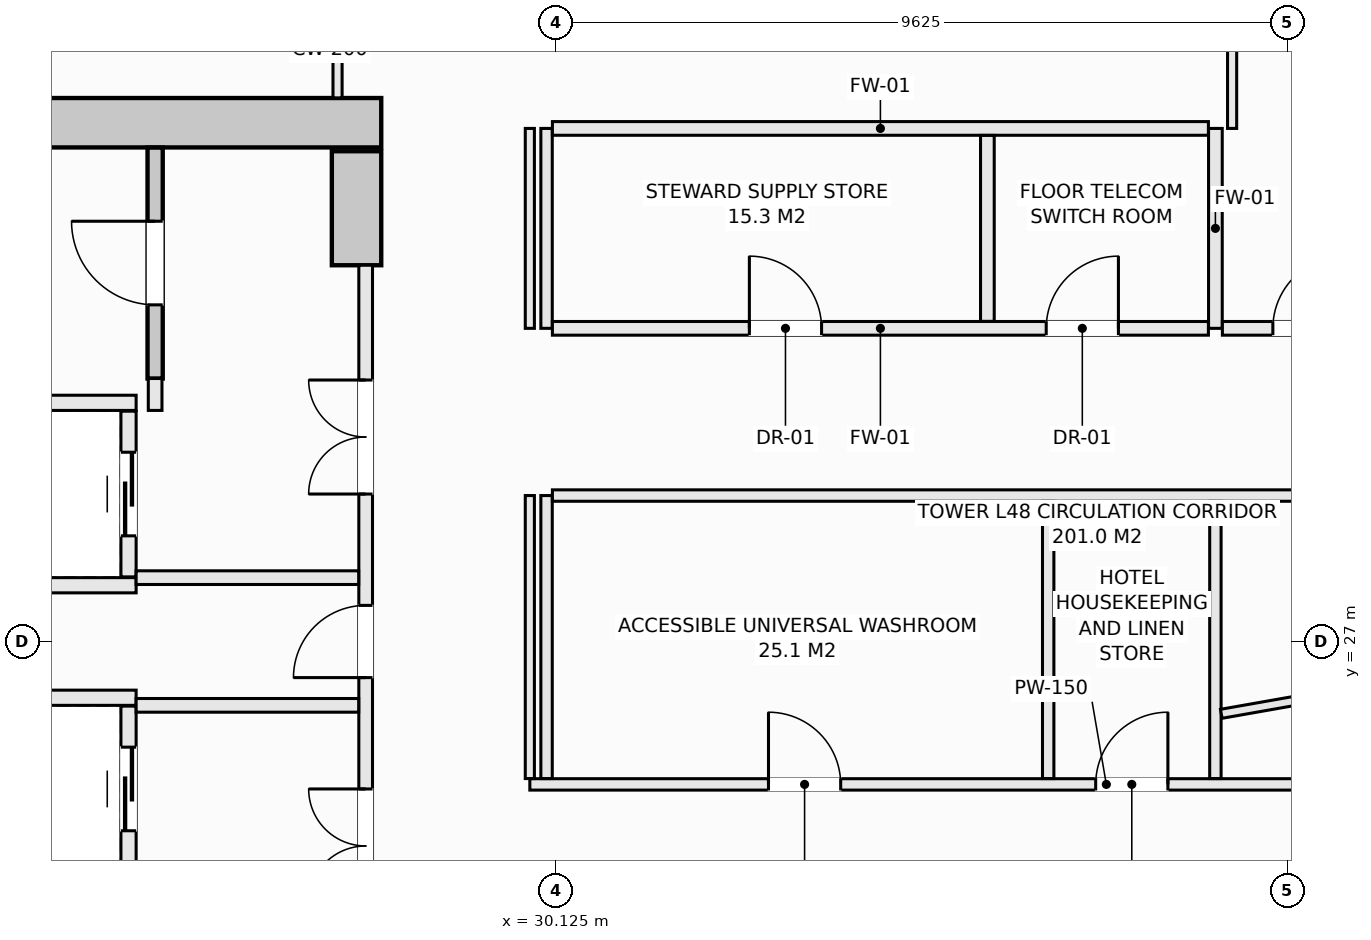
"""IFC4 building model, lengths in metres.
Left out: names, types, materials, properties, quantities, classifications, styles, units other than length and angle.
Written with IfcOpenShell. Run it as: python <this file> out.ifc"""

import sys

from ifc_helpers import new_model, si_unit, direction, frame, frame_2d, origin, place, context, subcontext, project, spatial, rectangle, extrude, element, fill, save


model = new_model("IFC4")
c1 = context("Model", 3, precision=1e-05, world=origin(), true_north=direction((0.0, 1.0)))
c2 = subcontext(c1, "Body", "Model", "MODEL_VIEW")
j1 = project(units=[si_unit("LENGTHUNIT", "METRE"), si_unit("PLANEANGLEUNIT", "RADIAN")], contexts=[c1])
p1 = place(None, origin())
s1 = spatial("IfcSite", under=j1, at=p1, CompositionType="ELEMENT")
p2 = place(p1, origin())
s2 = spatial("IfcBuilding", under=s1, at=p2, CompositionType="ELEMENT")
p3 = place(p2, frame((0.0, 0.0, 183.5)))
s3 = spatial("IfcBuildingStorey", under=s2, at=p3, CompositionType="ELEMENT", Elevation=183.5)
p4 = place(p3, frame((14.175, 33.825, -0.27), z_axis=(0.0, 0.0, 1.0), x_axis=(1.0, 0.0, 0.0)))
e1 = element("IfcWall", 1, at=p4, inside=s3, PredefinedType="SHEAR", context=c2, shape_type="SweptSolid", body=[
    extrude(rectangle(XDim=13.65, YDim=0.65, at=frame_2d((6.825, 0.0))), origin(), (0.0, 0.0, 1.0), 3.35),
])
p5 = place(p3, frame((27.5, 31.95, -0.27), z_axis=(0.0, 0.0, 1.0), x_axis=(0.0, 1.0, 0.0)))
e2 = element("IfcWall", 2, at=p5, inside=s3, PredefinedType="SHEAR", context=c2, shape_type="SweptSolid", body=[
    extrude(rectangle(XDim=1.5, YDim=0.65, at=frame_2d((0.75, 0.0))), origin(), (0.0, 0.0, 1.0), 3.35),
])
p6 = place(p3, frame((24.85, 30.46, -0.27), z_axis=(0.0, 0.0, 1.0), x_axis=(0.0, 1.0, 0.0)))
e3 = element("IfcWall", 3, at=p6, inside=s3, PredefinedType="SHEAR", context=c2, shape_type="SweptSolid", body=[
    extrude(rectangle(XDim=3.038, YDim=0.2, at=frame_2d((1.519, 0.0))), origin(), (0.0, 0.0, 1.0), 3.35),
])
p7 = place(p6, frame((0.969, 0.0, 0.27)))
e4 = element("IfcOpeningElement", 4, at=p7, cuts=e3, PredefinedType="OPENING", context=c2, shape_type="SweptSolid", body=[
    extrude(rectangle(XDim=1.1, YDim=2.15, at=frame_2d((0.55, 1.075))), frame((0.0, 0.11, 0.0), z_axis=(0.0, -1.0, 0.0), x_axis=(1.0, 0.0, 0.0)), (0.0, 0.0, 1.0), 0.22),
])
for number, where, z_axis, x_axis in (
    (5, (22.15, 30.14, 0.0), (0.0, 0.0, 1.0), (1.0, 0.0, 0.0)),
    (6, (22.15, 27.74, 0.0), (0.0, 0.0, 1.0), (1.0, 0.0, 0.0)),
):
    element("IfcWall", number, at=place(p3, frame(where, z_axis=z_axis, x_axis=x_axis)), inside=s3, PredefinedType="SOLIDWALL", context=c2, shape_type="SweptSolid", body=[
        extrude(rectangle(XDim=2.45, YDim=0.2, at=frame_2d((1.225, 0.0))), origin(), (0.0, 0.0, 1.0), 3.08),
    ])
p8 = place(p3, frame((24.5, 27.85, 0.0), z_axis=(0.0, 0.0, 1.0), x_axis=(0.0, 1.0, 0.0)))
e7 = element("IfcWall", 7, at=p8, inside=s3, PredefinedType="SOLIDWALL", context=c2, shape_type="SweptSolid", body=[
    extrude(rectangle(XDim=2.18, YDim=0.2, at=frame_2d((1.09, 0.0))), origin(), (0.0, 0.0, 1.0), 3.08),
])
p9 = place(p8, frame((0.54, 0.0, 0.0)))
e8 = element("IfcOpeningElement", 8, at=p9, cuts=e7, PredefinedType="OPENING", context=c2, shape_type="SweptSolid", body=[
    extrude(rectangle(XDim=1.1, YDim=2.2, at=frame_2d((0.55, 1.1))), frame((0.0, 0.11, 0.0), z_axis=(0.0, -1.0, 0.0), x_axis=(1.0, 0.0, 0.0)), (0.0, 0.0, 1.0), 0.22),
])
p10 = place(p3, frame((22.15, 26.26, 0.0), z_axis=(0.0, 0.0, 1.0), x_axis=(1.0, 0.0, 0.0)))
e9 = element("IfcWall", 9, at=p10, inside=s3, PredefinedType="SOLIDWALL", context=c2, shape_type="SweptSolid", body=[
    extrude(rectangle(XDim=2.45, YDim=0.2, at=frame_2d((1.225, 0.0))), origin(), (0.0, 0.0, 1.0), 3.08),
])
p11 = place(p3, frame((24.5, 23.97, 0.0), z_axis=(0.0, 0.0, 1.0), x_axis=(0.0, 1.0, 0.0)))
e10 = element("IfcWall", 10, at=p11, inside=s3, PredefinedType="SOLIDWALL", context=c2, shape_type="SweptSolid", body=[
    extrude(rectangle(XDim=2.18, YDim=0.2, at=frame_2d((1.09, 0.0))), origin(), (0.0, 0.0, 1.0), 3.08),
])
p12 = place(p11, frame((0.54, 0.0, 0.0)))
e11 = element("IfcOpeningElement", 11, at=p12, cuts=e10, PredefinedType="OPENING", context=c2, shape_type="SweptSolid", body=[
    extrude(rectangle(XDim=1.1, YDim=2.2, at=frame_2d((0.55, 1.1))), frame((0.0, 0.11, 0.0), z_axis=(0.0, -1.0, 0.0), x_axis=(1.0, 0.0, 0.0)), (0.0, 0.0, 1.0), 0.22),
])
p13 = place(p3, frame((24.85, 30.04, 0.0), z_axis=(0.0, 0.0, 1.0), x_axis=(0.0, 1.0, 0.0)))
e12 = element("IfcWall", 12, at=p13, inside=s3, PredefinedType="SOLIDWALL", context=c2, shape_type="SweptSolid", body=[
    extrude(rectangle(XDim=0.42, YDim=0.18, at=frame_2d((0.21, 0.0))), origin(), (0.0, 0.0, 1.0), 3.08),
])
p14 = place(p3, frame((27.62, 22.05, 0.0), z_axis=(0.0, 0.0, 1.0), x_axis=(0.0, 1.0, 0.0)))
e13 = element("IfcWall", 13, at=p14, inside=s3, PredefinedType="SOLIDWALL", context=c2, shape_type="SweptSolid", body=[
    extrude(rectangle(XDim=9.9, YDim=0.18, at=frame_2d((4.95, 0.0))), origin(), (0.0, 0.0, 1.0), 3.08),
])
p15 = place(p14, frame((4.475, 0.0, 0.0)))
e14 = element("IfcOpeningElement", 14, at=p15, cuts=e13, PredefinedType="OPENING", context=c2, shape_type="SweptSolid", body=[
    extrude(rectangle(XDim=0.95, YDim=2.1, at=frame_2d((0.475, 1.05))), frame((0.0, 0.1, 0.0), z_axis=(0.0, -1.0, 0.0), x_axis=(1.0, 0.0, 0.0)), (0.0, 0.0, 1.0), 0.2),
])
p16 = place(p14, frame((6.89, 0.0, 0.0)))
e15 = element("IfcOpeningElement", 15, at=p16, cuts=e13, PredefinedType="OPENING", context=c2, shape_type="SweptSolid", body=[
    extrude(rectangle(XDim=1.5, YDim=2.2, at=frame_2d((0.75, 1.1))), frame((0.0, 0.1, 0.0), z_axis=(0.0, -1.0, 0.0), x_axis=(1.0, 0.0, 0.0)), (0.0, 0.0, 1.0), 0.2),
])
p17 = place(p14, frame((1.51, 0.0, 0.0)))
e16 = element("IfcOpeningElement", 16, at=p17, cuts=e13, PredefinedType="OPENING", context=c2, shape_type="SweptSolid", body=[
    extrude(rectangle(XDim=1.5, YDim=2.2, at=frame_2d((0.75, 1.1))), frame((0.0, 0.1, 0.0), z_axis=(0.0, -1.0, 0.0), x_axis=(1.0, 0.0, 0.0)), (0.0, 0.0, 1.0), 0.2),
])
for number, where, z_axis, x_axis in (
    (17, (24.6, 27.84, 0.0), (0.0, 0.0, 1.0), (1.0, 0.0, 0.0)),
    (18, (24.6, 26.16, 0.0), (0.0, 0.0, 1.0), (1.0, 0.0, 0.0)),
):
    element("IfcWall", number, at=place(p3, frame(where, z_axis=z_axis, x_axis=x_axis)), inside=s3, PredefinedType="SOLIDWALL", context=c2, shape_type="SweptSolid", body=[
        extrude(rectangle(XDim=2.928, YDim=0.18, at=frame_2d((1.464, 0.0))), origin(), (0.0, 0.0, 1.0), 3.08),
    ])
p18 = place(p3, frame((29.78, 25.12, 0.0), z_axis=(0.0, 0.0, 1.0), x_axis=(1.0, 0.0, 0.0)))
e19 = element("IfcWall", 19, at=p18, inside=s3, PredefinedType="PARTITIONING", context=c2, shape_type="SweptSolid", body=[
    extrude(rectangle(XDim=15.17, YDim=0.15, at=frame_2d((7.585, 0.0))), origin(), (0.0, 0.0, 1.0), 3.08),
])
p19 = place(p18, frame((3.14, 0.0, 0.0)))
e20 = element("IfcOpeningElement", 20, at=p19, cuts=e19, PredefinedType="OPENING", context=c2, shape_type="SweptSolid", body=[
    extrude(rectangle(XDim=0.95, YDim=2.1, at=frame_2d((0.475, 1.05))), frame((0.0, 0.085, 0.0), z_axis=(0.0, -1.0, 0.0), x_axis=(1.0, 0.0, 0.0)), (0.0, 0.0, 1.0), 0.17),
])
p20 = place(p18, frame((7.445, 0.0, 0.0)))
e21 = element("IfcOpeningElement", 21, at=p20, cuts=e19, PredefinedType="OPENING", context=c2, shape_type="SweptSolid", body=[
    extrude(rectangle(XDim=0.95, YDim=2.1, at=frame_2d((0.475, 1.05))), frame((0.0, 0.085, 0.0), z_axis=(0.0, -1.0, 0.0), x_axis=(1.0, 0.0, 0.0)), (0.0, 0.0, 1.0), 0.17),
])
p21 = place(p3, frame((30.0, 25.197, 0.0), z_axis=(0.0, 0.0, 1.0), x_axis=(0.0, 1.0, 0.0)))
e22 = element("IfcWall", 22, at=p21, inside=s3, PredefinedType="PARTITIONING", context=c2, shape_type="SweptSolid", body=[
    extrude(rectangle(XDim=3.723, YDim=0.15, at=frame_2d((1.861, 0.0))), origin(), (0.0, 0.0, 1.0), 3.08),
])
p22 = place(p3, frame((30.0, 31.12, 0.0), z_axis=(0.0, 0.0, 1.0), x_axis=(0.0, 1.0, 0.0)))
e23 = element("IfcWall", 23, at=p22, inside=s3, PredefinedType="PARTITIONING", context=c2, shape_type="SweptSolid", body=[
    extrude(rectangle(XDim=2.63, YDim=0.15, at=frame_2d((1.315, 0.0))), origin(), (0.0, 0.0, 1.0), 3.08),
])
p23 = place(p3, frame((30.077, 28.92, 0.0), z_axis=(0.0, 0.0, 1.0), x_axis=(1.0, 0.0, 0.0)))
e24 = element("IfcWall", 24, at=p23, inside=s3, PredefinedType="PARTITIONING", context=c2, shape_type="SweptSolid", body=[
    extrude(rectangle(XDim=14.873, YDim=0.15, at=frame_2d((7.437, 0.0))), origin(), (0.0, 0.0, 1.0), 3.08),
])
p24 = place(p23, frame((11.118, 0.0, 0.0)))
e25 = element("IfcOpeningElement", 25, at=p24, cuts=e24, PredefinedType="OPENING", context=c2, shape_type="SweptSolid", body=[
    extrude(rectangle(XDim=0.95, YDim=2.1, at=frame_2d((0.475, 1.05))), frame((0.0, 0.085, 0.0), z_axis=(0.0, -1.0, 0.0), x_axis=(1.0, 0.0, 0.0)), (0.0, 0.0, 1.0), 0.17),
])
for number, where, z_axis, x_axis in (
    (26, (36.6, 25.197, 0.0), (0.0, 0.0, 1.0), (0.0, 1.0, 0.0)),
    (27, (38.8, 25.197, 0.0), (0.0, 0.0, 1.0), (0.0, 1.0, 0.0)),
):
    element("IfcWall", number, at=place(p3, frame(where, z_axis=z_axis, x_axis=x_axis)), inside=s3, PredefinedType="PARTITIONING", context=c2, shape_type="SweptSolid", body=[
        extrude(rectangle(XDim=3.646, YDim=0.15, at=frame_2d((1.823, 0.0))), origin(), (0.0, 0.0, 1.0), 3.08),
    ])
p25 = place(p3, frame((38.8, 31.12, 0.0), z_axis=(0.0, 0.0, 1.0), x_axis=(0.0, 1.0, 0.0)))
e28 = element("IfcWall", 28, at=p25, inside=s3, PredefinedType="SOLIDWALL", context=c2, shape_type="SweptSolid", body=[
    extrude(rectangle(XDim=2.63, YDim=0.18, at=frame_2d((1.315, 0.0))), origin(), (0.0, 0.0, 1.0), 3.08),
])
p26 = place(p3, frame((30.077, 31.12, 0.0), z_axis=(0.0, 0.0, 1.0), x_axis=(1.0, 0.0, 0.0)))
e29 = element("IfcWall", 29, at=p26, inside=s3, PredefinedType="SOLIDWALL", context=c2, shape_type="SweptSolid", body=[
    extrude(rectangle(XDim=8.631, YDim=0.18, at=frame_2d((4.315, 0.0))), origin(), (0.0, 0.0, 1.0), 3.08),
])
p27 = place(p26, frame((2.592, 0.0, 0.0)))
e30 = element("IfcOpeningElement", 30, at=p27, cuts=e29, PredefinedType="OPENING", context=c2, shape_type="SweptSolid", body=[
    extrude(rectangle(XDim=0.95, YDim=2.1, at=frame_2d((0.475, 1.05))), frame((0.0, 0.1, 0.0), z_axis=(0.0, -1.0, 0.0), x_axis=(1.0, 0.0, 0.0)), (0.0, 0.0, 1.0), 0.2),
])
p28 = place(p26, frame((6.497, 0.0, 0.0)))
e31 = element("IfcOpeningElement", 31, at=p28, cuts=e29, PredefinedType="OPENING", context=c2, shape_type="SweptSolid", body=[
    extrude(rectangle(XDim=0.95, YDim=2.1, at=frame_2d((0.475, 1.05))), frame((0.0, 0.1, 0.0), z_axis=(0.0, -1.0, 0.0), x_axis=(1.0, 0.0, 0.0)), (0.0, 0.0, 1.0), 0.2),
])
p29 = place(p3, frame((38.892, 31.12, 0.0), z_axis=(0.0, 0.0, 1.0), x_axis=(1.0, 0.0, 0.0)))
e32 = element("IfcWall", 32, at=p29, inside=s3, PredefinedType="SOLIDWALL", context=c2, shape_type="SweptSolid", body=[
    extrude(rectangle(XDim=6.058, YDim=0.18, at=frame_2d((3.029, 0.0))), origin(), (0.0, 0.0, 1.0), 3.08),
])
p30 = place(p29, frame((3.703, 0.0, 0.0)))
e33 = element("IfcOpeningElement", 33, at=p30, cuts=e32, PredefinedType="OPENING", context=c2, shape_type="SweptSolid", body=[
    extrude(rectangle(XDim=0.95, YDim=2.1, at=frame_2d((0.475, 1.05))), frame((0.0, 0.1, 0.0), z_axis=(0.0, -1.0, 0.0), x_axis=(1.0, 0.0, 0.0)), (0.0, 0.0, 1.0), 0.2),
])
p31 = place(p29, frame((0.664, 0.0, 0.0)))
e34 = element("IfcOpeningElement", 34, at=p31, cuts=e32, PredefinedType="OPENING", context=c2, shape_type="SweptSolid", body=[
    extrude(rectangle(XDim=0.95, YDim=2.1, at=frame_2d((0.475, 1.05))), frame((0.0, 0.1, 0.0), z_axis=(0.0, -1.0, 0.0), x_axis=(1.0, 0.0, 0.0)), (0.0, 0.0, 1.0), 0.2),
])
p32 = place(p3, frame((30.077, 33.75, 0.0), z_axis=(0.0, 0.0, 1.0), x_axis=(1.0, 0.0, 0.0)))
e35 = element("IfcWall", 35, at=p32, inside=s3, PredefinedType="SOLIDWALL", context=c2, shape_type="SweptSolid", body=[
    extrude(rectangle(XDim=8.631, YDim=0.18, at=frame_2d((4.315, 0.0))), origin(), (0.0, 0.0, 1.0), 3.08),
])
p33 = place(p3, frame((35.8, 31.212, 0.0), z_axis=(0.0, 0.0, 1.0), x_axis=(0.0, 1.0, 0.0)))
e36 = element("IfcWall", 36, at=p33, inside=s3, PredefinedType="SOLIDWALL", context=c2, shape_type="SweptSolid", body=[
    extrude(rectangle(XDim=2.446, YDim=0.18, at=frame_2d((1.223, 0.0))), origin(), (0.0, 0.0, 1.0), 3.08),
])
p34 = place(p3, frame((39.02, 33.75, 0.0), z_axis=(0.0, 0.0, 1.0), x_axis=(0.0, 1.0, 0.0)))
e37 = element("IfcWall", 37, at=p34, inside=s3, PredefinedType="PARTITIONING", context=c2, shape_type="SweptSolid", body=[
    extrude(rectangle(XDim=2.0, YDim=0.12, at=frame_2d((1.0, 0.0))), origin(), (0.0, 0.0, 1.0), 3.08),
])
p35 = place(p3, frame((27.25, 34.152, 0.0), z_axis=(0.0, 0.0, 1.0), x_axis=(0.0, 1.0, 0.0)))
e38 = element("IfcWall", 38, at=p35, inside=s3, PredefinedType="PARTITIONING", context=c2, shape_type="SweptSolid", body=[
    extrude(rectangle(XDim=0.806, YDim=0.12, at=frame_2d((0.403, 0.0))), origin(), (0.0, 0.0, 1.0), 3.08),
])
p36 = place(p3, frame((29.78, 25.197, 0.0), z_axis=(0.0, 0.0, 1.0), x_axis=(0.0, 1.0, 0.0)))
e39 = element("IfcWall", 39, at=p36, inside=s3, PredefinedType="PARTITIONING", context=c2, shape_type="SweptSolid", body=[
    extrude(rectangle(XDim=3.723, YDim=0.12, at=frame_2d((1.861, 0.0))), origin(), (0.0, 0.0, 1.0), 3.08),
])
p37 = place(p3, frame((29.78, 31.12, 0.0), z_axis=(0.0, 0.0, 1.0), x_axis=(0.0, 1.0, 0.0)))
e40 = element("IfcWall", 40, at=p37, inside=s3, PredefinedType="PARTITIONING", context=c2, shape_type="SweptSolid", body=[
    extrude(rectangle(XDim=2.63, YDim=0.12, at=frame_2d((1.315, 0.0))), origin(), (0.0, 0.0, 1.0), 3.08),
])
p38 = place(p3, frame((38.877, 26.049, 0.0), z_axis=(0.0, 0.0, 1.0), x_axis=(0.984853517989, 0.173388431286, 0.0)))
e41 = element("IfcWall", 41, at=p38, inside=s3, PredefinedType="PARTITIONING", context=c2, shape_type="SweptSolid", body=[
    extrude(rectangle(XDim=2.702, YDim=0.12, at=frame_2d((1.351, 0.0))), origin(), (0.0, 0.0, 1.0), 3.08),
])
p39 = place(p7, origin())
e42 = element("IfcDoor", 42, at=p39, inside=s3, OperationType="SINGLE_SWING_RIGHT", PredefinedType="DOOR", context=c2, shape_type="SweptSolid", body=[
    extrude(rectangle(XDim=1.1, YDim=2.15, at=frame_2d((0.55, 1.075))), frame((0.0, 0.025, 0.0), z_axis=(0.0, -1.0, 0.0), x_axis=(1.0, 0.0, 0.0)), (0.0, 0.0, 1.0), 0.05),
])
fill(e4, e42)
p40 = place(p9, origin())
e43 = element("IfcDoor", 43, at=p40, inside=s3, OperationType="SLIDING_TO_LEFT", PredefinedType="DOOR", context=c2, shape_type="SweptSolid", body=[
    extrude(rectangle(XDim=1.1, YDim=2.2, at=frame_2d((0.55, 1.1))), frame((0.0, 0.025, 0.0), z_axis=(0.0, -1.0, 0.0), x_axis=(1.0, 0.0, 0.0)), (0.0, 0.0, 1.0), 0.05),
])
fill(e8, e43)
p41 = place(p12, origin())
e44 = element("IfcDoor", 44, at=p41, inside=s3, OperationType="SLIDING_TO_LEFT", PredefinedType="DOOR", context=c2, shape_type="SweptSolid", body=[
    extrude(rectangle(XDim=1.1, YDim=2.2, at=frame_2d((0.55, 1.1))), frame((0.0, 0.025, 0.0), z_axis=(0.0, -1.0, 0.0), x_axis=(1.0, 0.0, 0.0)), (0.0, 0.0, 1.0), 0.05),
])
fill(e11, e44)
p42 = place(p15, origin())
e45 = element("IfcDoor", 45, at=p42, inside=s3, OperationType="SINGLE_SWING_LEFT", PredefinedType="DOOR", context=c2, shape_type="SweptSolid", body=[
    extrude(rectangle(XDim=0.95, YDim=2.1, at=frame_2d((0.475, 1.05))), frame((0.0, 0.025, 0.0), z_axis=(0.0, -1.0, 0.0), x_axis=(1.0, 0.0, 0.0)), (0.0, 0.0, 1.0), 0.05),
])
fill(e14, e45)
p43 = place(p16, origin())
e46 = element("IfcDoor", 46, at=p43, inside=s3, OperationType="DOUBLE_DOOR_SINGLE_SWING", PredefinedType="DOOR", context=c2, shape_type="SweptSolid", body=[
    extrude(rectangle(XDim=1.5, YDim=2.2, at=frame_2d((0.75, 1.1))), frame((0.0, 0.025, 0.0), z_axis=(0.0, -1.0, 0.0), x_axis=(1.0, 0.0, 0.0)), (0.0, 0.0, 1.0), 0.05),
])
fill(e15, e46)
p44 = place(p17, origin())
e47 = element("IfcDoor", 47, at=p44, inside=s3, OperationType="DOUBLE_DOOR_SINGLE_SWING", PredefinedType="DOOR", context=c2, shape_type="SweptSolid", body=[
    extrude(rectangle(XDim=1.5, YDim=2.2, at=frame_2d((0.75, 1.1))), frame((0.0, 0.025, 0.0), z_axis=(0.0, -1.0, 0.0), x_axis=(1.0, 0.0, 0.0)), (0.0, 0.0, 1.0), 0.05),
])
fill(e16, e47)
p45 = place(p19, origin())
e48 = element("IfcDoor", 48, at=p45, inside=s3, OperationType="SINGLE_SWING_LEFT", PredefinedType="DOOR", context=c2, shape_type="SweptSolid", body=[
    extrude(rectangle(XDim=0.95, YDim=2.1, at=frame_2d((0.475, 1.05))), frame((0.0, 0.025, 0.0), z_axis=(0.0, -1.0, 0.0), x_axis=(1.0, 0.0, 0.0)), (0.0, 0.0, 1.0), 0.05),
])
fill(e20, e48)
p46 = place(p20, origin())
e49 = element("IfcDoor", 49, at=p46, inside=s3, OperationType="SINGLE_SWING_RIGHT", PredefinedType="DOOR", context=c2, shape_type="SweptSolid", body=[
    extrude(rectangle(XDim=0.95, YDim=2.1, at=frame_2d((0.475, 1.05))), frame((0.0, 0.025, 0.0), z_axis=(0.0, -1.0, 0.0), x_axis=(1.0, 0.0, 0.0)), (0.0, 0.0, 1.0), 0.05),
])
fill(e21, e49)
p47 = place(p27, origin())
e50 = element("IfcDoor", 50, at=p47, inside=s3, OperationType="SINGLE_SWING_LEFT", PredefinedType="DOOR", context=c2, shape_type="SweptSolid", body=[
    extrude(rectangle(XDim=0.95, YDim=2.1, at=frame_2d((0.475, 1.05))), frame((0.0, 0.025, 0.0), z_axis=(0.0, -1.0, 0.0), x_axis=(1.0, 0.0, 0.0)), (0.0, 0.0, 1.0), 0.05),
])
fill(e30, e50)
p48 = place(p28, origin())
e51 = element("IfcDoor", 51, at=p48, inside=s3, OperationType="SINGLE_SWING_RIGHT", PredefinedType="DOOR", context=c2, shape_type="SweptSolid", body=[
    extrude(rectangle(XDim=0.95, YDim=2.1, at=frame_2d((0.475, 1.05))), frame((0.0, 0.025, 0.0), z_axis=(0.0, -1.0, 0.0), x_axis=(1.0, 0.0, 0.0)), (0.0, 0.0, 1.0), 0.05),
])
fill(e31, e51)
p49 = place(p31, origin())
e52 = element("IfcDoor", 52, at=p49, inside=s3, OperationType="SINGLE_SWING_RIGHT", PredefinedType="DOOR", context=c2, shape_type="SweptSolid", body=[
    extrude(rectangle(XDim=0.95, YDim=2.1, at=frame_2d((0.475, 1.05))), frame((0.0, 0.025, 0.0), z_axis=(0.0, -1.0, 0.0), x_axis=(1.0, 0.0, 0.0)), (0.0, 0.0, 1.0), 0.05),
])
fill(e34, e52)
save(model, sys.argv[1])
